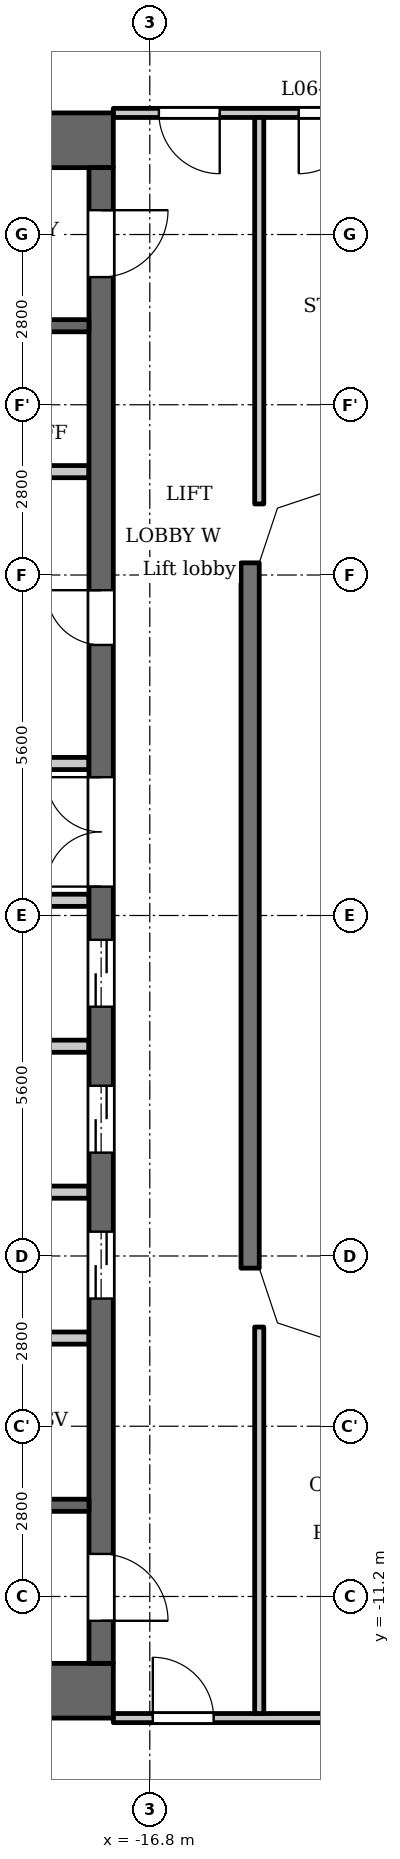
"""IFC4 building model, lengths in metres.
Left out: names, types, materials, properties, quantities, classifications, styles, units other than length and angle.
Written with IfcOpenShell. Run it as: python <this file> out.ifc"""

import sys

from ifc_helpers import new_model, si_unit, direction, frame, frame_2d, origin, place, context, subcontext, project, spatial, polyline, rectangle, outline, extrude, element, fill, save


model = new_model("IFC4")
c1 = context("Model", 3, precision=1e-05, world=origin(), true_north=direction((0.0, 1.0)))
c2 = subcontext(c1, "Body", "Model", "MODEL_VIEW")
j1 = project(units=[si_unit("LENGTHUNIT", "METRE"), si_unit("PLANEANGLEUNIT", "RADIAN")], contexts=[c1])
p1 = place(None, origin())
s1 = spatial("IfcSite", under=j1, at=p1, CompositionType="ELEMENT")
p2 = place(p1, origin())
s2 = spatial("IfcBuilding", under=s1, at=p2, CompositionType="ELEMENT")
p3 = place(p2, frame((0.0, 0.0, 30.5)))
s3 = spatial("IfcBuildingStorey", under=s2, at=p3, CompositionType="ELEMENT", Elevation=30.5)
p4 = place(p3, frame((-15.15, -5.8, 0.0), z_axis=(0.0, 0.0, 1.0), x_axis=(0.0, 1.0, 0.0)))
e1 = element("IfcWall", 1, at=p4, inside=s3, PredefinedType="SOLIDWALL", context=c2, shape_type="SweptSolid", body=[
    extrude(rectangle(XDim=11.6, YDim=0.3, at=frame_2d((5.8, 0.0))), origin(), (0.0, 0.0, 1.0), 3.2),
])
for number, where, z_axis, x_axis in (
    (2, (-17.4, 12.75, 0.0), (0.0, 0.0, 1.0), (-1.0, 0.0, 0.0)),
    (3, (-17.4, -12.75, 0.0), (0.0, 0.0, 1.0), (-1.0, 0.0, 0.0)),
):
    element("IfcWall", number, at=place(p3, frame(where, z_axis=z_axis, x_axis=x_axis)), inside=s3, PredefinedType="SHEAR", context=c2, shape_type="SweptSolid", body=[
        extrude(rectangle(XDim=10.4, YDim=0.9, at=frame_2d((5.2, 0.0))), origin(), (0.0, 0.0, 1.0), 3.2),
    ])
p5 = place(p3, frame((-17.6, -12.3, 0.0), z_axis=(0.0, 0.0, 1.0), x_axis=(0.0, 1.0, 0.0)))
e4 = element("IfcWall", 4, at=p5, inside=s3, PredefinedType="SHEAR", context=c2, shape_type="SweptSolid", body=[
    extrude(rectangle(XDim=24.6, YDim=0.4, at=frame_2d((12.3, 0.0))), origin(), (0.0, 0.0, 1.0), 3.2),
])
p6 = place(p5, frame((6.0, 0.0, 0.0)))
e5 = element("IfcOpeningElement", 5, at=p6, cuts=e4, PredefinedType="OPENING", context=c2, shape_type="SweptSolid", body=[
    extrude(rectangle(XDim=1.1, YDim=2.1, at=frame_2d((0.55, 1.05))), frame((0.0, 0.21, 0.0), z_axis=(0.0, -1.0, 0.0), x_axis=(1.0, 0.0, 0.0)), (0.0, 0.0, 1.0), 0.42),
])
p7 = place(p5, frame((8.4, 0.0, 0.0)))
e6 = element("IfcOpeningElement", 6, at=p7, cuts=e4, PredefinedType="OPENING", context=c2, shape_type="SweptSolid", body=[
    extrude(rectangle(XDim=1.1, YDim=2.1, at=frame_2d((0.55, 1.05))), frame((0.0, 0.21, 0.0), z_axis=(0.0, -1.0, 0.0), x_axis=(1.0, 0.0, 0.0)), (0.0, 0.0, 1.0), 0.42),
])
p8 = place(p5, frame((10.8, 0.0, 0.0)))
e7 = element("IfcOpeningElement", 7, at=p8, cuts=e4, PredefinedType="OPENING", context=c2, shape_type="SweptSolid", body=[
    extrude(rectangle(XDim=1.1, YDim=2.1, at=frame_2d((0.55, 1.05))), frame((0.0, 0.21, 0.0), z_axis=(0.0, -1.0, 0.0), x_axis=(1.0, 0.0, 0.0)), (0.0, 0.0, 1.0), 0.42),
])
p9 = place(p5, frame((16.75, 0.0, 0.0)))
e8 = element("IfcOpeningElement", 8, at=p9, cuts=e4, PredefinedType="OPENING", context=c2, shape_type="SweptSolid", body=[
    extrude(rectangle(XDim=0.9, YDim=2.1, at=frame_2d((0.45, 1.05))), frame((0.0, 0.21, 0.0), z_axis=(0.0, -1.0, 0.0), x_axis=(1.0, 0.0, 0.0)), (0.0, 0.0, 1.0), 0.42),
])
p10 = place(p5, frame((22.8, 0.0, 0.0)))
e9 = element("IfcOpeningElement", 9, at=p10, cuts=e4, PredefinedType="OPENING", context=c2, shape_type="SweptSolid", body=[
    extrude(rectangle(XDim=1.1, YDim=2.1, at=frame_2d((0.55, 1.05))), frame((0.0, 0.21, 0.0), z_axis=(0.0, -1.0, 0.0), x_axis=(1.0, 0.0, 0.0)), (0.0, 0.0, 1.0), 0.42),
])
p11 = place(p5, frame((0.7, 0.0, 0.0)))
e10 = element("IfcOpeningElement", 10, at=p11, cuts=e4, PredefinedType="OPENING", context=c2, shape_type="SweptSolid", body=[
    extrude(rectangle(XDim=1.1, YDim=2.1, at=frame_2d((0.55, 1.05))), frame((0.0, 0.21, 0.0), z_axis=(0.0, -1.0, 0.0), x_axis=(1.0, 0.0, 0.0)), (0.0, 0.0, 1.0), 0.42),
])
p12 = place(p5, frame((12.775, 0.0, 0.0)))
e11 = element("IfcOpeningElement", 11, at=p12, cuts=e4, PredefinedType="OPENING", context=c2, shape_type="SweptSolid", body=[
    extrude(rectangle(XDim=1.8, YDim=2.1, at=frame_2d((0.9, 1.05))), frame((0.0, 0.21, 0.0), z_axis=(0.0, -1.0, 0.0), x_axis=(1.0, 0.0, 0.0)), (0.0, 0.0, 1.0), 0.42),
])
p13 = place(p3, frame((-17.8, -9.7, 0.0), z_axis=(0.0, 0.0, 1.0), x_axis=(-1.0, 0.0, 0.0)))
e12 = element("IfcWall", 12, at=p13, inside=s3, PredefinedType="SHEAR", context=c2, shape_type="SweptSolid", body=[
    extrude(rectangle(XDim=8.3, YDim=0.2, at=frame_2d((4.15, 0.0))), origin(), (0.0, 0.0, 1.0), 3.2),
])
p14 = place(p13, frame((0.85, 0.0, 0.0)))
e13 = element("IfcOpeningElement", 13, at=p14, cuts=e12, PredefinedType="OPENING", context=c2, shape_type="SweptSolid", body=[
    extrude(rectangle(XDim=1.1, YDim=2.1, at=frame_2d((0.55, 1.05))), frame((0.0, 0.11, 0.0), z_axis=(0.0, -1.0, 0.0), x_axis=(1.0, 0.0, 0.0)), (0.0, 0.0, 1.0), 0.22),
])
p15 = place(p13, frame((3.75, 0.0, 0.0)))
e14 = element("IfcOpeningElement", 14, at=p15, cuts=e12, PredefinedType="OPENING", context=c2, shape_type="SweptSolid", body=[
    extrude(rectangle(XDim=1.1, YDim=2.1, at=frame_2d((0.55, 1.05))), frame((0.0, 0.11, 0.0), z_axis=(0.0, -1.0, 0.0), x_axis=(1.0, 0.0, 0.0)), (0.0, 0.0, 1.0), 0.22),
])
for number, where, z_axis, x_axis in (
    (15, (-17.8, -6.95, 0.0), (0.0, 0.0, 1.0), (-1.0, 0.0, 0.0)),
    (16, (-17.8, -4.55, 0.0), (0.0, 0.0, 1.0), (-1.0, 0.0, 0.0)),
    (17, (-17.8, -2.15, 0.0), (0.0, 0.0, 1.0), (-1.0, 0.0, 0.0)),
):
    element("IfcWall", number, at=place(p3, frame(where, z_axis=z_axis, x_axis=x_axis)), inside=s3, PredefinedType="PARTITIONING", context=c2, shape_type="SweptSolid", body=[
        extrude(rectangle(XDim=2.8, YDim=0.2, at=frame_2d((1.4, 0.0))), origin(), (0.0, 0.0, 1.0), 3.2),
    ])
for number, where, z_axis, x_axis in (
    (18, (-17.8, 0.25, 0.0), (0.0, 0.0, 1.0), (-1.0, 0.0, 0.0)),
    (19, (-17.8, 2.5, 0.0), (0.0, 0.0, 1.0), (-1.0, 0.0, 0.0)),
):
    element("IfcWall", number, at=place(p3, frame(where, z_axis=z_axis, x_axis=x_axis)), inside=s3, PredefinedType="PARTITIONING", context=c2, shape_type="SweptSolid", body=[
        extrude(rectangle(XDim=3.0, YDim=0.2, at=frame_2d((1.5, 0.0))), origin(), (0.0, 0.0, 1.0), 3.2),
    ])
p16 = place(p3, frame((-17.8, 7.3, 0.0), z_axis=(0.0, 0.0, 1.0), x_axis=(-1.0, 0.0, 0.0)))
e20 = element("IfcWall", 20, at=p16, inside=s3, PredefinedType="PARTITIONING", context=c2, shape_type="SweptSolid", body=[
    extrude(rectangle(XDim=2.8, YDim=0.2, at=frame_2d((1.4, 0.0))), origin(), (0.0, 0.0, 1.0), 3.2),
])
p17 = place(p3, frame((-17.8, 9.7, 0.0), z_axis=(0.0, 0.0, 1.0), x_axis=(-1.0, 0.0, 0.0)))
e21 = element("IfcWall", 21, at=p17, inside=s3, PredefinedType="SHEAR", context=c2, shape_type="SweptSolid", body=[
    extrude(rectangle(XDim=8.3, YDim=0.2, at=frame_2d((4.15, 0.0))), origin(), (0.0, 0.0, 1.0), 3.2),
])
p18 = place(p17, frame((0.85, 0.0, 0.0)))
e22 = element("IfcOpeningElement", 22, at=p18, cuts=e21, PredefinedType="OPENING", context=c2, shape_type="SweptSolid", body=[
    extrude(rectangle(XDim=1.1, YDim=2.1, at=frame_2d((0.55, 1.05))), frame((0.0, 0.11, 0.0), z_axis=(0.0, -1.0, 0.0), x_axis=(1.0, 0.0, 0.0)), (0.0, 0.0, 1.0), 0.22),
])
p19 = place(p17, frame((3.75, 0.0, 0.0)))
e23 = element("IfcOpeningElement", 23, at=p19, cuts=e21, PredefinedType="OPENING", context=c2, shape_type="SweptSolid", body=[
    extrude(rectangle(XDim=1.1, YDim=2.1, at=frame_2d((0.55, 1.05))), frame((0.0, 0.11, 0.0), z_axis=(0.0, -1.0, 0.0), x_axis=(1.0, 0.0, 0.0)), (0.0, 0.0, 1.0), 0.22),
])
p20 = place(p3, frame((-17.4, -13.2, 0.0), z_axis=(0.0, 0.0, 1.0), x_axis=(1.0, 0.0, 0.0)))
e24 = element("IfcWall", 24, at=p20, inside=s3, PredefinedType="PARTITIONING", context=c2, shape_type="SweptSolid", body=[
    extrude(rectangle(XDim=34.8, YDim=0.15, at=frame_2d((17.4, 0.0))), origin(), (0.0, 0.0, 1.0), 3.2),
])
p21 = place(p20, frame((0.65, 0.0, 0.0)))
e25 = element("IfcOpeningElement", 25, at=p21, cuts=e24, PredefinedType="OPENING", context=c2, shape_type="SweptSolid", body=[
    extrude(rectangle(XDim=1.0, YDim=2.1, at=frame_2d((0.5, 1.05))), frame((0.0, 0.085, 0.0), z_axis=(0.0, -1.0, 0.0), x_axis=(1.0, 0.0, 0.0)), (0.0, 0.0, 1.0), 0.17),
])
p22 = place(p20, frame((33.05, 0.0, 0.0)))
e26 = element("IfcOpeningElement", 26, at=p22, cuts=e24, PredefinedType="OPENING", context=c2, shape_type="SweptSolid", body=[
    extrude(rectangle(XDim=1.0, YDim=2.1, at=frame_2d((0.5, 1.05))), frame((0.0, 0.085, 0.0), z_axis=(0.0, -1.0, 0.0), x_axis=(1.0, 0.0, 0.0)), (0.0, 0.0, 1.0), 0.17),
])
p23 = place(p20, frame((4.55, 0.0, 0.0)))
e27 = element("IfcOpeningElement", 27, at=p23, cuts=e24, PredefinedType="OPENING", context=c2, shape_type="SweptSolid", body=[
    extrude(rectangle(XDim=1.0, YDim=2.1, at=frame_2d((0.5, 1.05))), frame((0.0, 0.085, 0.0), z_axis=(0.0, -1.0, 0.0), x_axis=(1.0, 0.0, 0.0)), (0.0, 0.0, 1.0), 0.17),
])
p24 = place(p20, frame((6.9, 0.0, 0.0)))
e28 = element("IfcOpeningElement", 28, at=p24, cuts=e24, PredefinedType="OPENING", context=c2, shape_type="SweptSolid", body=[
    extrude(rectangle(XDim=1.0, YDim=2.1, at=frame_2d((0.5, 1.05))), frame((0.0, 0.085, 0.0), z_axis=(0.0, -1.0, 0.0), x_axis=(1.0, 0.0, 0.0)), (0.0, 0.0, 1.0), 0.17),
])
p25 = place(p20, frame((15.75, 0.0, 0.0)))
e29 = element("IfcOpeningElement", 29, at=p25, cuts=e24, PredefinedType="OPENING", context=c2, shape_type="SweptSolid", body=[
    extrude(rectangle(XDim=1.0, YDim=2.1, at=frame_2d((0.5, 1.05))), frame((0.0, 0.085, 0.0), z_axis=(0.0, -1.0, 0.0), x_axis=(1.0, 0.0, 0.0)), (0.0, 0.0, 1.0), 0.17),
])
p26 = place(p20, frame((18.1, 0.0, 0.0)))
e30 = element("IfcOpeningElement", 30, at=p26, cuts=e24, PredefinedType="OPENING", context=c2, shape_type="SweptSolid", body=[
    extrude(rectangle(XDim=1.0, YDim=2.1, at=frame_2d((0.5, 1.05))), frame((0.0, 0.085, 0.0), z_axis=(0.0, -1.0, 0.0), x_axis=(1.0, 0.0, 0.0)), (0.0, 0.0, 1.0), 0.17),
])
p27 = place(p20, frame((26.95, 0.0, 0.0)))
e31 = element("IfcOpeningElement", 31, at=p27, cuts=e24, PredefinedType="OPENING", context=c2, shape_type="SweptSolid", body=[
    extrude(rectangle(XDim=1.0, YDim=2.1, at=frame_2d((0.5, 1.05))), frame((0.0, 0.085, 0.0), z_axis=(0.0, -1.0, 0.0), x_axis=(1.0, 0.0, 0.0)), (0.0, 0.0, 1.0), 0.17),
])
p28 = place(p20, frame((29.25, 0.0, 0.0)))
e32 = element("IfcOpeningElement", 32, at=p28, cuts=e24, PredefinedType="OPENING", context=c2, shape_type="SweptSolid", body=[
    extrude(rectangle(XDim=1.0, YDim=2.1, at=frame_2d((0.5, 1.05))), frame((0.0, 0.085, 0.0), z_axis=(0.0, -1.0, 0.0), x_axis=(1.0, 0.0, 0.0)), (0.0, 0.0, 1.0), 0.17),
])
p29 = place(p3, frame((-17.4, 13.2, 0.0), z_axis=(0.0, 0.0, 1.0), x_axis=(1.0, 0.0, 0.0)))
e33 = element("IfcWall", 33, at=p29, inside=s3, PredefinedType="PARTITIONING", context=c2, shape_type="SweptSolid", body=[
    extrude(rectangle(XDim=34.8, YDim=0.15, at=frame_2d((17.4, 0.0))), origin(), (0.0, 0.0, 1.0), 3.2),
])
p30 = place(p29, frame((0.75, 0.0, 0.0)))
e34 = element("IfcOpeningElement", 34, at=p30, cuts=e33, PredefinedType="OPENING", context=c2, shape_type="SweptSolid", body=[
    extrude(rectangle(XDim=1.0, YDim=2.1, at=frame_2d((0.5, 1.05))), frame((0.0, 0.085, 0.0), z_axis=(0.0, -1.0, 0.0), x_axis=(1.0, 0.0, 0.0)), (0.0, 0.0, 1.0), 0.17),
])
p31 = place(p29, frame((33.15, 0.0, 0.0)))
e35 = element("IfcOpeningElement", 35, at=p31, cuts=e33, PredefinedType="OPENING", context=c2, shape_type="SweptSolid", body=[
    extrude(rectangle(XDim=1.0, YDim=2.1, at=frame_2d((0.5, 1.05))), frame((0.0, 0.085, 0.0), z_axis=(0.0, -1.0, 0.0), x_axis=(1.0, 0.0, 0.0)), (0.0, 0.0, 1.0), 0.17),
])
p32 = place(p29, frame((3.05, 0.0, 0.0)))
e36 = element("IfcOpeningElement", 36, at=p32, cuts=e33, PredefinedType="OPENING", context=c2, shape_type="SweptSolid", body=[
    extrude(rectangle(XDim=1.0, YDim=2.1, at=frame_2d((0.5, 1.05))), frame((0.0, 0.085, 0.0), z_axis=(0.0, -1.0, 0.0), x_axis=(1.0, 0.0, 0.0)), (0.0, 0.0, 1.0), 0.17),
])
p33 = place(p29, frame((10.1, 0.0, 0.0)))
e37 = element("IfcOpeningElement", 37, at=p33, cuts=e33, PredefinedType="OPENING", context=c2, shape_type="SweptSolid", body=[
    extrude(rectangle(XDim=1.0, YDim=2.1, at=frame_2d((0.5, 1.05))), frame((0.0, 0.085, 0.0), z_axis=(0.0, -1.0, 0.0), x_axis=(1.0, 0.0, 0.0)), (0.0, 0.0, 1.0), 0.17),
])
p34 = place(p29, frame((12.45, 0.0, 0.0)))
e38 = element("IfcOpeningElement", 38, at=p34, cuts=e33, PredefinedType="OPENING", context=c2, shape_type="SweptSolid", body=[
    extrude(rectangle(XDim=1.0, YDim=2.1, at=frame_2d((0.5, 1.05))), frame((0.0, 0.085, 0.0), z_axis=(0.0, -1.0, 0.0), x_axis=(1.0, 0.0, 0.0)), (0.0, 0.0, 1.0), 0.17),
])
p35 = place(p29, frame((21.3, 0.0, 0.0)))
e39 = element("IfcOpeningElement", 39, at=p35, cuts=e33, PredefinedType="OPENING", context=c2, shape_type="SweptSolid", body=[
    extrude(rectangle(XDim=1.0, YDim=2.1, at=frame_2d((0.5, 1.05))), frame((0.0, 0.085, 0.0), z_axis=(0.0, -1.0, 0.0), x_axis=(1.0, 0.0, 0.0)), (0.0, 0.0, 1.0), 0.17),
])
p36 = place(p29, frame((23.65, 0.0, 0.0)))
e40 = element("IfcOpeningElement", 40, at=p36, cuts=e33, PredefinedType="OPENING", context=c2, shape_type="SweptSolid", body=[
    extrude(rectangle(XDim=1.0, YDim=2.1, at=frame_2d((0.5, 1.05))), frame((0.0, 0.085, 0.0), z_axis=(0.0, -1.0, 0.0), x_axis=(1.0, 0.0, 0.0)), (0.0, 0.0, 1.0), 0.17),
])
p37 = place(p29, frame((30.75, 0.0, 0.0)))
e41 = element("IfcOpeningElement", 41, at=p37, cuts=e33, PredefinedType="OPENING", context=c2, shape_type="SweptSolid", body=[
    extrude(rectangle(XDim=1.0, YDim=2.1, at=frame_2d((0.5, 1.05))), frame((0.0, 0.085, 0.0), z_axis=(0.0, -1.0, 0.0), x_axis=(1.0, 0.0, 0.0)), (0.0, 0.0, 1.0), 0.17),
])
for number, where, z_axis, x_axis in (
    (42, (-15.0, -13.125, 0.0), (0.0, 0.0, 1.0), (0.0, 1.0, 0.0)),
    (43, (-15.0, 6.769, 0.0), (0.0, 0.0, 1.0), (0.0, 1.0, 0.0)),
):
    element("IfcWall", number, at=place(p3, frame(where, z_axis=z_axis, x_axis=x_axis)), inside=s3, PredefinedType="PARTITIONING", context=c2, shape_type="SweptSolid", body=[
        extrude(rectangle(XDim=6.356, YDim=0.15, at=frame_2d((3.178, 0.0))), origin(), (0.0, 0.0, 1.0), 3.2),
    ])
p38 = place(p3, origin())
e44 = element("IfcWall", 44, at=p38, inside=s3, PredefinedType="SOLIDWALL", context=c2, shape_type="SweptSolid", body=[
    extrude(outline(polyline([(-13.849, 7.3), (-14.937, 6.937), (-15.3, 5.849), (-15.3, 5.8), (-15.0, 5.8), (-14.7, 6.7), (-13.8, 7.0), (-13.8, 7.3), (-13.849, 7.3)])), origin(), (0.0, 0.0, 1.0), 3.2),
])
e45 = element("IfcWall", 45, at=p38, inside=s3, PredefinedType="SOLIDWALL", context=c2, shape_type="SweptSolid", body=[
    extrude(outline(polyline([(-14.937, -6.937), (-13.849, -7.3), (-13.8, -7.3), (-13.8, -7.0), (-14.7, -6.7), (-15.0, -5.8), (-15.3, -5.8), (-15.3, -5.849), (-14.937, -6.937)])), origin(), (0.0, 0.0, 1.0), 3.2),
])
p39 = place(p6, origin())
e46 = element("IfcDoor", 46, at=p39, inside=s3, OperationType="DOUBLE_DOOR_SLIDING", PredefinedType="DOOR", context=c2, shape_type="SweptSolid", body=[
    extrude(rectangle(XDim=1.1, YDim=2.1, at=frame_2d((0.55, 1.05))), frame((0.0, 0.025, 0.0), z_axis=(0.0, -1.0, 0.0), x_axis=(1.0, 0.0, 0.0)), (0.0, 0.0, 1.0), 0.05),
])
fill(e5, e46)
p40 = place(p7, origin())
e47 = element("IfcDoor", 47, at=p40, inside=s3, OperationType="DOUBLE_DOOR_SLIDING", PredefinedType="DOOR", context=c2, shape_type="SweptSolid", body=[
    extrude(rectangle(XDim=1.1, YDim=2.1, at=frame_2d((0.55, 1.05))), frame((0.0, 0.025, 0.0), z_axis=(0.0, -1.0, 0.0), x_axis=(1.0, 0.0, 0.0)), (0.0, 0.0, 1.0), 0.05),
])
fill(e6, e47)
p41 = place(p8, origin())
e48 = element("IfcDoor", 48, at=p41, inside=s3, OperationType="DOUBLE_DOOR_SLIDING", PredefinedType="DOOR", context=c2, shape_type="SweptSolid", body=[
    extrude(rectangle(XDim=1.1, YDim=2.1, at=frame_2d((0.55, 1.05))), frame((0.0, 0.025, 0.0), z_axis=(0.0, -1.0, 0.0), x_axis=(1.0, 0.0, 0.0)), (0.0, 0.0, 1.0), 0.05),
])
fill(e7, e48)
p42 = place(p9, origin())
e49 = element("IfcDoor", 49, at=p42, inside=s3, OperationType="SINGLE_SWING_LEFT", PredefinedType="DOOR", context=c2, shape_type="SweptSolid", body=[
    extrude(rectangle(XDim=0.9, YDim=2.1, at=frame_2d((0.45, 1.05))), frame((0.0, 0.025, 0.0), z_axis=(0.0, -1.0, 0.0), x_axis=(1.0, 0.0, 0.0)), (0.0, 0.0, 1.0), 0.05),
])
fill(e8, e49)
p43 = place(p10, origin())
e50 = element("IfcDoor", 50, at=p43, inside=s3, OperationType="SINGLE_SWING_RIGHT", PredefinedType="DOOR", context=c2, shape_type="SweptSolid", body=[
    extrude(rectangle(XDim=1.1, YDim=2.1, at=frame_2d((0.55, 1.05))), frame((0.0, 0.025, 0.0), z_axis=(0.0, -1.0, 0.0), x_axis=(1.0, 0.0, 0.0)), (0.0, 0.0, 1.0), 0.05),
])
fill(e9, e50)
p44 = place(p11, origin())
e51 = element("IfcDoor", 51, at=p44, inside=s3, OperationType="SINGLE_SWING_LEFT", PredefinedType="DOOR", context=c2, shape_type="SweptSolid", body=[
    extrude(rectangle(XDim=1.1, YDim=2.1, at=frame_2d((0.55, 1.05))), frame((0.0, 0.025, 0.0), z_axis=(0.0, -1.0, 0.0), x_axis=(1.0, 0.0, 0.0)), (0.0, 0.0, 1.0), 0.05),
])
fill(e10, e51)
p45 = place(p12, origin())
e52 = element("IfcDoor", 52, at=p45, inside=s3, OperationType="DOUBLE_DOOR_SINGLE_SWING", PredefinedType="DOOR", context=c2, shape_type="SweptSolid", body=[
    extrude(rectangle(XDim=1.8, YDim=2.1, at=frame_2d((0.9, 1.05))), frame((0.0, 0.025, 0.0), z_axis=(0.0, -1.0, 0.0), x_axis=(1.0, 0.0, 0.0)), (0.0, 0.0, 1.0), 0.05),
])
fill(e11, e52)
p46 = place(p30, origin())
e53 = element("IfcDoor", 53, at=p46, inside=s3, OperationType="SINGLE_SWING_RIGHT", PredefinedType="DOOR", context=c2, shape_type="SweptSolid", body=[
    extrude(rectangle(XDim=1.0, YDim=2.1, at=frame_2d((0.5, 1.05))), frame((0.0, 0.025, 0.0), z_axis=(0.0, -1.0, 0.0), x_axis=(1.0, 0.0, 0.0)), (0.0, 0.0, 1.0), 0.05),
])
fill(e34, e53)
p47 = place(p21, origin())
e54 = element("IfcDoor", 54, at=p47, inside=s3, OperationType="SINGLE_SWING_RIGHT", PredefinedType="DOOR", context=c2, shape_type="SweptSolid", body=[
    extrude(rectangle(XDim=1.0, YDim=2.1, at=frame_2d((0.5, 1.05))), frame((0.0, 0.025, 0.0), z_axis=(0.0, -1.0, 0.0), x_axis=(1.0, 0.0, 0.0)), (0.0, 0.0, 1.0), 0.05),
])
fill(e25, e54)
p48 = place(p32, origin())
e55 = element("IfcDoor", 55, at=p48, inside=s3, OperationType="SINGLE_SWING_LEFT", PredefinedType="DOOR", context=c2, shape_type="SweptSolid", body=[
    extrude(rectangle(XDim=1.0, YDim=2.1, at=frame_2d((0.5, 1.05))), frame((0.0, 0.025, 0.0), z_axis=(0.0, -1.0, 0.0), x_axis=(1.0, 0.0, 0.0)), (0.0, 0.0, 1.0), 0.05),
])
fill(e36, e55)
save(model, sys.argv[1])
